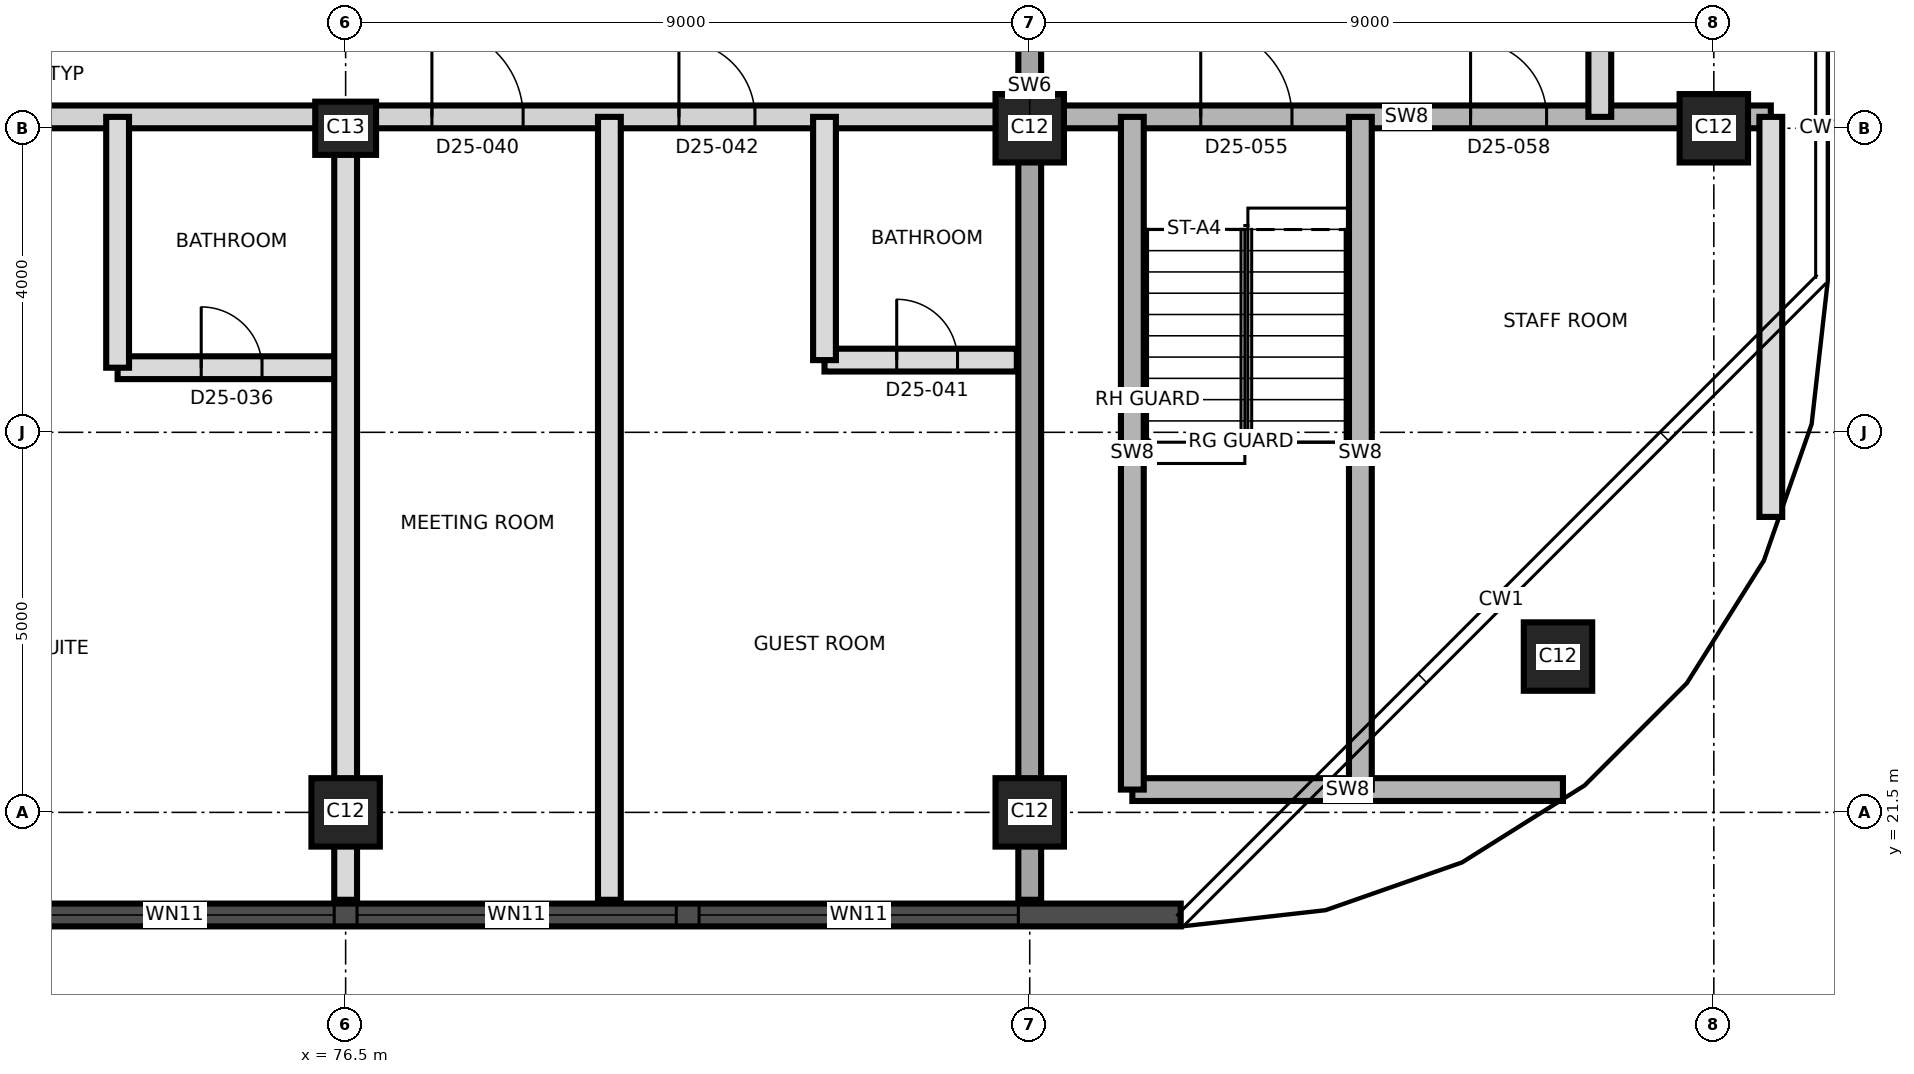
"""IFC4 building model, lengths in metres.
Left out: names, types, materials, properties, quantities, classifications, styles, units other than length and angle.
Written with IfcOpenShell. Run it as: python <this file> out.ifc"""

import sys

from ifc_helpers import new_model, si_unit, direction, frame, frame_2d, origin, origin_2d, place, context, subcontext, project, spatial, rectangle, extrude, element, fill, save


model = new_model("IFC4")
c1 = context("Model", 3, precision=1e-05, world=origin(), true_north=direction((0.0, 1.0)))
c2 = subcontext(c1, "Body", "Model", "MODEL_VIEW")
j1 = project(units=[si_unit("LENGTHUNIT", "METRE"), si_unit("PLANEANGLEUNIT", "RADIAN")], contexts=[c1])
p1 = place(None, origin())
s1 = spatial("IfcSite", under=j1, at=p1, CompositionType="ELEMENT")
p2 = place(p1, origin())
s2 = spatial("IfcBuilding", under=s1, at=p2, CompositionType="ELEMENT")
p3 = place(p2, frame((0.0, 0.0, 225.4)))
s3 = spatial("IfcBuildingStorey", under=s2, at=p3, CompositionType="ELEMENT", Elevation=225.4)
for number, where, z_axis, x_axis in (
    (1, (76.5, 21.5, 0.0), (0.0, 0.0, 1.0), (1.0, 0.0, 0.0)),
    (2, (85.5, 21.5, 0.0), (0.0, 0.0, 1.0), (1.0, 0.0, 0.0)),
    (3, (92.45, 23.55, 0.0), (0.0, 0.0, 1.0), (1.0, 0.0, 0.0)),
):
    element("IfcColumn", number, at=place(p3, frame(where, z_axis=z_axis, x_axis=x_axis)), inside=s3, PredefinedType="COLUMN", context=c2, shape_type="SweptSolid", body=[
        extrude(rectangle(XDim=0.9, YDim=0.9, at=origin_2d()), origin(), (0.0, 0.0, 1.0), 3.7),
    ])
p4 = place(p3, frame((76.5, 30.5, 0.0), z_axis=(0.0, 0.0, 1.0), x_axis=(1.0, 0.0, 0.0)))
e4 = element("IfcColumn", 4, at=p4, inside=s3, PredefinedType="COLUMN", context=c2, shape_type="SweptSolid", body=[
    extrude(rectangle(XDim=0.8, YDim=0.7, at=origin_2d()), origin(), (0.0, 0.0, 1.0), 3.7),
])
for number, where, z_axis, x_axis in (
    (5, (85.5, 30.5, 0.0), (0.0, 0.0, 1.0), (1.0, 0.0, 0.0)),
    (6, (94.5, 30.5, 0.0), (0.0, 0.0, 1.0), (1.0, 0.0, 0.0)),
):
    element("IfcColumn", number, at=place(p3, frame(where, z_axis=z_axis, x_axis=x_axis)), inside=s3, PredefinedType="COLUMN", context=c2, shape_type="SweptSolid", body=[
        extrude(rectangle(XDim=0.9, YDim=0.9, at=origin_2d()), origin(), (0.0, 0.0, 1.0), 3.7),
    ])
p5 = place(p3, frame((85.5, 20.35, 0.0), z_axis=(0.0, 0.0, 1.0), x_axis=(0.0, 1.0, 0.0)))
e7 = element("IfcWall", 7, at=p5, inside=s3, PredefinedType="SHEAR", context=c2, shape_type="SweptSolid", body=[
    extrude(rectangle(XDim=20.3, YDim=0.3, at=frame_2d((10.15, 0.0))), origin(), (0.0, 0.0, 1.0), 3.7),
])
p6 = place(p5, frame((11.35, 0.0, 0.0)))
e8 = element("IfcOpeningElement", 8, at=p6, cuts=e7, PredefinedType="OPENING", context=c2, shape_type="SweptSolid", body=[
    extrude(rectangle(XDim=1.4, YDim=2.1, at=frame_2d((0.7, 1.05))), frame((0.0, 0.16, 0.0), z_axis=(0.0, -1.0, 0.0), x_axis=(1.0, 0.0, 0.0)), (0.0, 0.0, 1.0), 0.32),
])
p7 = place(p3, frame((44.011, 20.15, 0.0), z_axis=(0.0, 0.0, 1.0), x_axis=(1.0, 0.0, 0.0)))
e9 = element("IfcWall", 9, at=p7, inside=s3, PredefinedType="SOLIDWALL", context=c2, shape_type="SweptSolid", body=[
    extrude(rectangle(XDim=43.476, YDim=0.3, at=frame_2d((21.738, 0.0))), origin(), (0.0, 0.0, 1.0), 3.4),
])
p8 = place(p7, frame((1.845, 0.0, 0.3)))
e10 = element("IfcOpeningElement", 10, at=p8, cuts=e9, PredefinedType="OPENING", context=c2, shape_type="SweptSolid", body=[
    extrude(rectangle(XDim=1.8, YDim=2.4, at=frame_2d((0.9, 1.2))), frame((0.0, 0.16, 0.0), z_axis=(0.0, -1.0, 0.0), x_axis=(1.0, 0.0, 0.0)), (0.0, 0.0, 1.0), 0.32),
])
p9 = place(p7, frame((5.639, 0.0, 0.9)))
e11 = element("IfcOpeningElement", 11, at=p9, cuts=e9, PredefinedType="OPENING", context=c2, shape_type="SweptSolid", body=[
    extrude(rectangle(XDim=4.2, YDim=1.5, at=frame_2d((2.1, 0.75))), frame((0.0, 0.16, 0.0), z_axis=(0.0, -1.0, 0.0), x_axis=(1.0, 0.0, 0.0)), (0.0, 0.0, 1.0), 0.32),
])
p10 = place(p7, frame((10.139, 0.0, 0.9)))
e12 = element("IfcOpeningElement", 12, at=p10, cuts=e9, PredefinedType="OPENING", context=c2, shape_type="SweptSolid", body=[
    extrude(rectangle(XDim=4.2, YDim=1.5, at=frame_2d((2.1, 0.75))), frame((0.0, 0.16, 0.0), z_axis=(0.0, -1.0, 0.0), x_axis=(1.0, 0.0, 0.0)), (0.0, 0.0, 1.0), 0.32),
])
p11 = place(p7, frame((14.639, 0.0, 0.9)))
e13 = element("IfcOpeningElement", 13, at=p11, cuts=e9, PredefinedType="OPENING", context=c2, shape_type="SweptSolid", body=[
    extrude(rectangle(XDim=4.2, YDim=1.5, at=frame_2d((2.1, 0.75))), frame((0.0, 0.16, 0.0), z_axis=(0.0, -1.0, 0.0), x_axis=(1.0, 0.0, 0.0)), (0.0, 0.0, 1.0), 0.32),
])
p12 = place(p7, frame((19.139, 0.0, 0.9)))
e14 = element("IfcOpeningElement", 14, at=p12, cuts=e9, PredefinedType="OPENING", context=c2, shape_type="SweptSolid", body=[
    extrude(rectangle(XDim=4.2, YDim=1.5, at=frame_2d((2.1, 0.75))), frame((0.0, 0.16, 0.0), z_axis=(0.0, -1.0, 0.0), x_axis=(1.0, 0.0, 0.0)), (0.0, 0.0, 1.0), 0.32),
])
p13 = place(p7, frame((23.639, 0.0, 0.9)))
e15 = element("IfcOpeningElement", 15, at=p13, cuts=e9, PredefinedType="OPENING", context=c2, shape_type="SweptSolid", body=[
    extrude(rectangle(XDim=4.2, YDim=1.5, at=frame_2d((2.1, 0.75))), frame((0.0, 0.16, 0.0), z_axis=(0.0, -1.0, 0.0), x_axis=(1.0, 0.0, 0.0)), (0.0, 0.0, 1.0), 0.32),
])
p14 = place(p7, frame((28.139, 0.0, 0.9)))
e16 = element("IfcOpeningElement", 16, at=p14, cuts=e9, PredefinedType="OPENING", context=c2, shape_type="SweptSolid", body=[
    extrude(rectangle(XDim=4.2, YDim=1.5, at=frame_2d((2.1, 0.75))), frame((0.0, 0.16, 0.0), z_axis=(0.0, -1.0, 0.0), x_axis=(1.0, 0.0, 0.0)), (0.0, 0.0, 1.0), 0.32),
])
p15 = place(p7, frame((32.639, 0.0, 0.9)))
e17 = element("IfcOpeningElement", 17, at=p15, cuts=e9, PredefinedType="OPENING", context=c2, shape_type="SweptSolid", body=[
    extrude(rectangle(XDim=4.2, YDim=1.5, at=frame_2d((2.1, 0.75))), frame((0.0, 0.16, 0.0), z_axis=(0.0, -1.0, 0.0), x_axis=(1.0, 0.0, 0.0)), (0.0, 0.0, 1.0), 0.32),
])
p16 = place(p7, frame((37.139, 0.0, 0.9)))
e18 = element("IfcOpeningElement", 18, at=p16, cuts=e9, PredefinedType="OPENING", context=c2, shape_type="SweptSolid", body=[
    extrude(rectangle(XDim=4.2, YDim=1.5, at=frame_2d((2.1, 0.75))), frame((0.0, 0.16, 0.0), z_axis=(0.0, -1.0, 0.0), x_axis=(1.0, 0.0, 0.0)), (0.0, 0.0, 1.0), 0.32),
])
p17 = place(p3, frame((86.85, 21.8, 0.0), z_axis=(0.0, 0.0, 1.0), x_axis=(1.0, 0.0, 0.0)))
e19 = element("IfcWall", 19, at=p17, inside=s3, PredefinedType="SHEAR", context=c2, shape_type="SweptSolid", body=[
    extrude(rectangle(XDim=5.665, YDim=0.3, at=frame_2d((2.833, 0.0))), origin(), (0.0, 0.0, 1.0), 3.4),
])
p18 = place(p3, frame((73.5, 27.35, 0.0), z_axis=(0.0, 0.0, 1.0), x_axis=(1.0, 0.0, 0.0)))
e20 = element("IfcWall", 20, at=p18, inside=s3, PredefinedType="PARTITIONING", context=c2, shape_type="SweptSolid", body=[
    extrude(rectangle(XDim=3.0, YDim=0.3, at=frame_2d((1.5, 0.0))), origin(), (0.0, 0.0, 1.0), 3.4),
])
p19 = place(p18, frame((1.1, 0.0, 0.0)))
e21 = element("IfcOpeningElement", 21, at=p19, cuts=e20, PredefinedType="OPENING", context=c2, shape_type="SweptSolid", body=[
    extrude(rectangle(XDim=0.8, YDim=2.1, at=frame_2d((0.4, 1.05))), frame((0.0, 0.16, 0.0), z_axis=(0.0, -1.0, 0.0), x_axis=(1.0, 0.0, 0.0)), (0.0, 0.0, 1.0), 0.32),
])
p20 = place(p3, frame((82.8, 27.45, 0.0), z_axis=(0.0, 0.0, 1.0), x_axis=(1.0, 0.0, 0.0)))
e22 = element("IfcWall", 22, at=p20, inside=s3, PredefinedType="PARTITIONING", context=c2, shape_type="SweptSolid", body=[
    extrude(rectangle(XDim=2.53, YDim=0.3, at=frame_2d((1.265, 0.0))), origin(), (0.0, 0.0, 1.0), 3.4),
])
p21 = place(p20, frame((0.95, 0.0, 0.0)))
e23 = element("IfcOpeningElement", 23, at=p21, cuts=e22, PredefinedType="OPENING", context=c2, shape_type="SweptSolid", body=[
    extrude(rectangle(XDim=0.8, YDim=2.1, at=frame_2d((0.4, 1.05))), frame((0.0, 0.16, 0.0), z_axis=(0.0, -1.0, 0.0), x_axis=(1.0, 0.0, 0.0)), (0.0, 0.0, 1.0), 0.32),
])
p22 = place(p3, frame((58.55, 30.65, 0.0), z_axis=(0.0, 0.0, 1.0), x_axis=(1.0, 0.0, 0.0)))
e24 = element("IfcWall", 24, at=p22, inside=s3, PredefinedType="PARTITIONING", context=c2, shape_type="SweptSolid", body=[
    extrude(rectangle(XDim=26.78, YDim=0.3, at=frame_2d((13.39, 0.0))), origin(), (0.0, 0.0, 1.0), 3.4),
])
p23 = place(p22, frame((1.65, 0.0, 0.0)))
e25 = element("IfcOpeningElement", 25, at=p23, cuts=e24, PredefinedType="OPENING", context=c2, shape_type="SweptSolid", body=[
    extrude(rectangle(XDim=1.2, YDim=2.1, at=frame_2d((0.6, 1.05))), frame((0.0, 0.16, 0.0), z_axis=(0.0, -1.0, 0.0), x_axis=(1.0, 0.0, 0.0)), (0.0, 0.0, 1.0), 0.32),
])
p24 = place(p22, frame((4.9, 0.0, 0.0)))
e26 = element("IfcOpeningElement", 26, at=p24, cuts=e24, PredefinedType="OPENING", context=c2, shape_type="SweptSolid", body=[
    extrude(rectangle(XDim=1.0, YDim=2.1, at=frame_2d((0.5, 1.05))), frame((0.0, 0.16, 0.0), z_axis=(0.0, -1.0, 0.0), x_axis=(1.0, 0.0, 0.0)), (0.0, 0.0, 1.0), 0.32),
])
p25 = place(p22, frame((12.95, 0.0, 0.0)))
e27 = element("IfcOpeningElement", 27, at=p25, cuts=e24, PredefinedType="OPENING", context=c2, shape_type="SweptSolid", body=[
    extrude(rectangle(XDim=1.0, YDim=2.4, at=frame_2d((0.5, 1.2))), frame((0.0, 0.16, 0.0), z_axis=(0.0, -1.0, 0.0), x_axis=(1.0, 0.0, 0.0)), (0.0, 0.0, 1.0), 0.32),
])
p26 = place(p22, frame((19.085, 0.0, 0.0)))
e28 = element("IfcOpeningElement", 28, at=p26, cuts=e24, PredefinedType="OPENING", context=c2, shape_type="SweptSolid", body=[
    extrude(rectangle(XDim=1.2, YDim=2.1, at=frame_2d((0.6, 1.05))), frame((0.0, 0.16, 0.0), z_axis=(0.0, -1.0, 0.0), x_axis=(1.0, 0.0, 0.0)), (0.0, 0.0, 1.0), 0.32),
])
p27 = place(p22, frame((22.335, 0.0, 0.0)))
e29 = element("IfcOpeningElement", 29, at=p27, cuts=e24, PredefinedType="OPENING", context=c2, shape_type="SweptSolid", body=[
    extrude(rectangle(XDim=1.0, YDim=2.1, at=frame_2d((0.5, 1.05))), frame((0.0, 0.16, 0.0), z_axis=(0.0, -1.0, 0.0), x_axis=(1.0, 0.0, 0.0)), (0.0, 0.0, 1.0), 0.32),
])
p28 = place(p3, frame((85.67, 30.65, 0.0), z_axis=(0.0, 0.0, 1.0), x_axis=(1.0, 0.0, 0.0)))
e30 = element("IfcWall", 30, at=p28, inside=s3, PredefinedType="SHEAR", context=c2, shape_type="SweptSolid", body=[
    extrude(rectangle(XDim=9.58, YDim=0.3, at=frame_2d((4.79, 0.0))), origin(), (0.0, 0.0, 1.0), 3.4),
])
p29 = place(p28, frame((2.08, 0.0, 0.0)))
e31 = element("IfcOpeningElement", 31, at=p29, cuts=e30, PredefinedType="OPENING", context=c2, shape_type="SweptSolid", body=[
    extrude(rectangle(XDim=1.2, YDim=2.1, at=frame_2d((0.6, 1.05))), frame((0.0, 0.16, 0.0), z_axis=(0.0, -1.0, 0.0), x_axis=(1.0, 0.0, 0.0)), (0.0, 0.0, 1.0), 0.32),
])
p30 = place(p28, frame((5.63, 0.0, 0.0)))
e32 = element("IfcOpeningElement", 32, at=p30, cuts=e30, PredefinedType="OPENING", context=c2, shape_type="SweptSolid", body=[
    extrude(rectangle(XDim=1.0, YDim=2.1, at=frame_2d((0.5, 1.05))), frame((0.0, 0.16, 0.0), z_axis=(0.0, -1.0, 0.0), x_axis=(1.0, 0.0, 0.0)), (0.0, 0.0, 1.0), 0.32),
])
p31 = place(p3, frame((73.5, 27.35, 0.0), z_axis=(0.0, 0.0, 1.0), x_axis=(0.0, 1.0, 0.0)))
e33 = element("IfcWall", 33, at=p31, inside=s3, PredefinedType="PARTITIONING", context=c2, shape_type="SweptSolid", body=[
    extrude(rectangle(XDim=3.3, YDim=0.3, at=frame_2d((1.65, 0.0))), origin(), (0.0, 0.0, 1.0), 3.4),
])
for number, where, z_axis, x_axis in (
    (34, (76.5, 20.35, 0.0), (0.0, 0.0, 1.0), (0.0, 1.0, 0.0)),
    (35, (79.97, 20.35, 0.0), (0.0, 0.0, 1.0), (0.0, 1.0, 0.0)),
):
    element("IfcWall", number, at=place(p3, frame(where, z_axis=z_axis, x_axis=x_axis)), inside=s3, PredefinedType="PARTITIONING", context=c2, shape_type="SweptSolid", body=[
        extrude(rectangle(XDim=10.3, YDim=0.3, at=frame_2d((5.15, 0.0))), origin(), (0.0, 0.0, 1.0), 3.4),
    ])
p32 = place(p3, frame((82.8, 27.45, 0.0), z_axis=(0.0, 0.0, 1.0), x_axis=(0.0, 1.0, 0.0)))
e36 = element("IfcWall", 36, at=p32, inside=s3, PredefinedType="PARTITIONING", context=c2, shape_type="SweptSolid", body=[
    extrude(rectangle(XDim=3.2, YDim=0.3, at=frame_2d((1.6, 0.0))), origin(), (0.0, 0.0, 1.0), 3.4),
])
for number, where, z_axis, x_axis in (
    (37, (86.85, 21.8, 0.0), (0.0, 0.0, 1.0), (0.0, 1.0, 0.0)),
    (38, (89.85, 21.8, 0.0), (0.0, 0.0, 1.0), (0.0, 1.0, 0.0)),
):
    element("IfcWall", number, at=place(p3, frame(where, z_axis=z_axis, x_axis=x_axis)), inside=s3, PredefinedType="SHEAR", context=c2, shape_type="SweptSolid", body=[
        extrude(rectangle(XDim=8.85, YDim=0.3, at=frame_2d((4.425, 0.0))), origin(), (0.0, 0.0, 1.0), 3.4),
    ])
p33 = place(p3, frame((93.0, 30.65, 0.0), z_axis=(0.0, 0.0, 1.0), x_axis=(0.0, 1.0, 0.0)))
e39 = element("IfcWall", 39, at=p33, inside=s3, PredefinedType="PARTITIONING", context=c2, shape_type="SweptSolid", body=[
    extrude(rectangle(XDim=2.7, YDim=0.3, at=frame_2d((1.35, 0.0))), origin(), (0.0, 0.0, 1.0), 3.4),
])
p34 = place(p3, frame((95.25, 25.387, 0.0), z_axis=(0.0, 0.0, 1.0), x_axis=(0.0, 1.0, 0.0)))
e40 = element("IfcWall", 40, at=p34, inside=s3, PredefinedType="PARTITIONING", context=c2, shape_type="SweptSolid", body=[
    extrude(rectangle(XDim=5.263, YDim=0.3, at=frame_2d((2.631, 0.0))), origin(), (0.0, 0.0, 1.0), 3.4),
])
p35 = place(p14, origin())
e41 = element("IfcWindow", 41, at=p35, inside=s3, PartitioningType="SINGLE_PANEL", PredefinedType="WINDOW", context=c2, shape_type="SweptSolid", body=[
    extrude(rectangle(XDim=4.2, YDim=1.5, at=frame_2d((2.1, 0.75))), frame((0.0, 0.03, 0.0), z_axis=(0.0, -1.0, 0.0), x_axis=(1.0, 0.0, 0.0)), (0.0, 0.0, 1.0), 0.06),
])
fill(e16, e41)
p36 = place(p15, origin())
e42 = element("IfcWindow", 42, at=p36, inside=s3, PartitioningType="SINGLE_PANEL", PredefinedType="WINDOW", context=c2, shape_type="SweptSolid", body=[
    extrude(rectangle(XDim=4.2, YDim=1.5, at=frame_2d((2.1, 0.75))), frame((0.0, 0.03, 0.0), z_axis=(0.0, -1.0, 0.0), x_axis=(1.0, 0.0, 0.0)), (0.0, 0.0, 1.0), 0.06),
])
fill(e17, e42)
p37 = place(p16, origin())
e43 = element("IfcWindow", 43, at=p37, inside=s3, PartitioningType="SINGLE_PANEL", PredefinedType="WINDOW", context=c2, shape_type="SweptSolid", body=[
    extrude(rectangle(XDim=4.2, YDim=1.5, at=frame_2d((2.1, 0.75))), frame((0.0, 0.03, 0.0), z_axis=(0.0, -1.0, 0.0), x_axis=(1.0, 0.0, 0.0)), (0.0, 0.0, 1.0), 0.06),
])
fill(e18, e43)
p38 = place(p19, origin())
e44 = element("IfcDoor", 44, at=p38, inside=s3, OperationType="SINGLE_SWING_RIGHT", PredefinedType="DOOR", context=c2, shape_type="SweptSolid", body=[
    extrude(rectangle(XDim=0.8, YDim=2.1, at=frame_2d((0.4, 1.05))), frame((0.0, 0.025, 0.0), z_axis=(0.0, -1.0, 0.0), x_axis=(1.0, 0.0, 0.0)), (0.0, 0.0, 1.0), 0.05),
])
fill(e21, e44)
p39 = place(p26, origin())
e45 = element("IfcDoor", 45, at=p39, inside=s3, OperationType="SINGLE_SWING_RIGHT", PredefinedType="DOOR", context=c2, shape_type="SweptSolid", body=[
    extrude(rectangle(XDim=1.2, YDim=2.1, at=frame_2d((0.6, 1.05))), frame((0.0, 0.025, 0.0), z_axis=(0.0, -1.0, 0.0), x_axis=(1.0, 0.0, 0.0)), (0.0, 0.0, 1.0), 0.05),
])
fill(e28, e45)
p40 = place(p21, origin())
e46 = element("IfcDoor", 46, at=p40, inside=s3, OperationType="SINGLE_SWING_LEFT", PredefinedType="DOOR", context=c2, shape_type="SweptSolid", body=[
    extrude(rectangle(XDim=0.8, YDim=2.1, at=frame_2d((0.4, 1.05))), frame((0.0, 0.025, 0.0), z_axis=(0.0, -1.0, 0.0), x_axis=(1.0, 0.0, 0.0)), (0.0, 0.0, 1.0), 0.05),
])
fill(e23, e46)
p41 = place(p27, origin())
e47 = element("IfcDoor", 47, at=p41, inside=s3, OperationType="SINGLE_SWING_LEFT", PredefinedType="DOOR", context=c2, shape_type="SweptSolid", body=[
    extrude(rectangle(XDim=1.0, YDim=2.1, at=frame_2d((0.5, 1.05))), frame((0.0, 0.025, 0.0), z_axis=(0.0, -1.0, 0.0), x_axis=(1.0, 0.0, 0.0)), (0.0, 0.0, 1.0), 0.05),
])
fill(e29, e47)
p42 = place(p29, origin())
e48 = element("IfcDoor", 48, at=p42, inside=s3, OperationType="SINGLE_SWING_LEFT", PredefinedType="DOOR", context=c2, shape_type="SweptSolid", body=[
    extrude(rectangle(XDim=1.2, YDim=2.1, at=frame_2d((0.6, 1.05))), frame((0.0, 0.025, 0.0), z_axis=(0.0, -1.0, 0.0), x_axis=(1.0, 0.0, 0.0)), (0.0, 0.0, 1.0), 0.05),
])
fill(e31, e48)
p43 = place(p30, origin())
e49 = element("IfcDoor", 49, at=p43, inside=s3, OperationType="SINGLE_SWING_LEFT", PredefinedType="DOOR", context=c2, shape_type="SweptSolid", body=[
    extrude(rectangle(XDim=1.0, YDim=2.1, at=frame_2d((0.5, 1.05))), frame((0.0, 0.025, 0.0), z_axis=(0.0, -1.0, 0.0), x_axis=(1.0, 0.0, 0.0)), (0.0, 0.0, 1.0), 0.05),
])
fill(e32, e49)
save(model, sys.argv[1])
